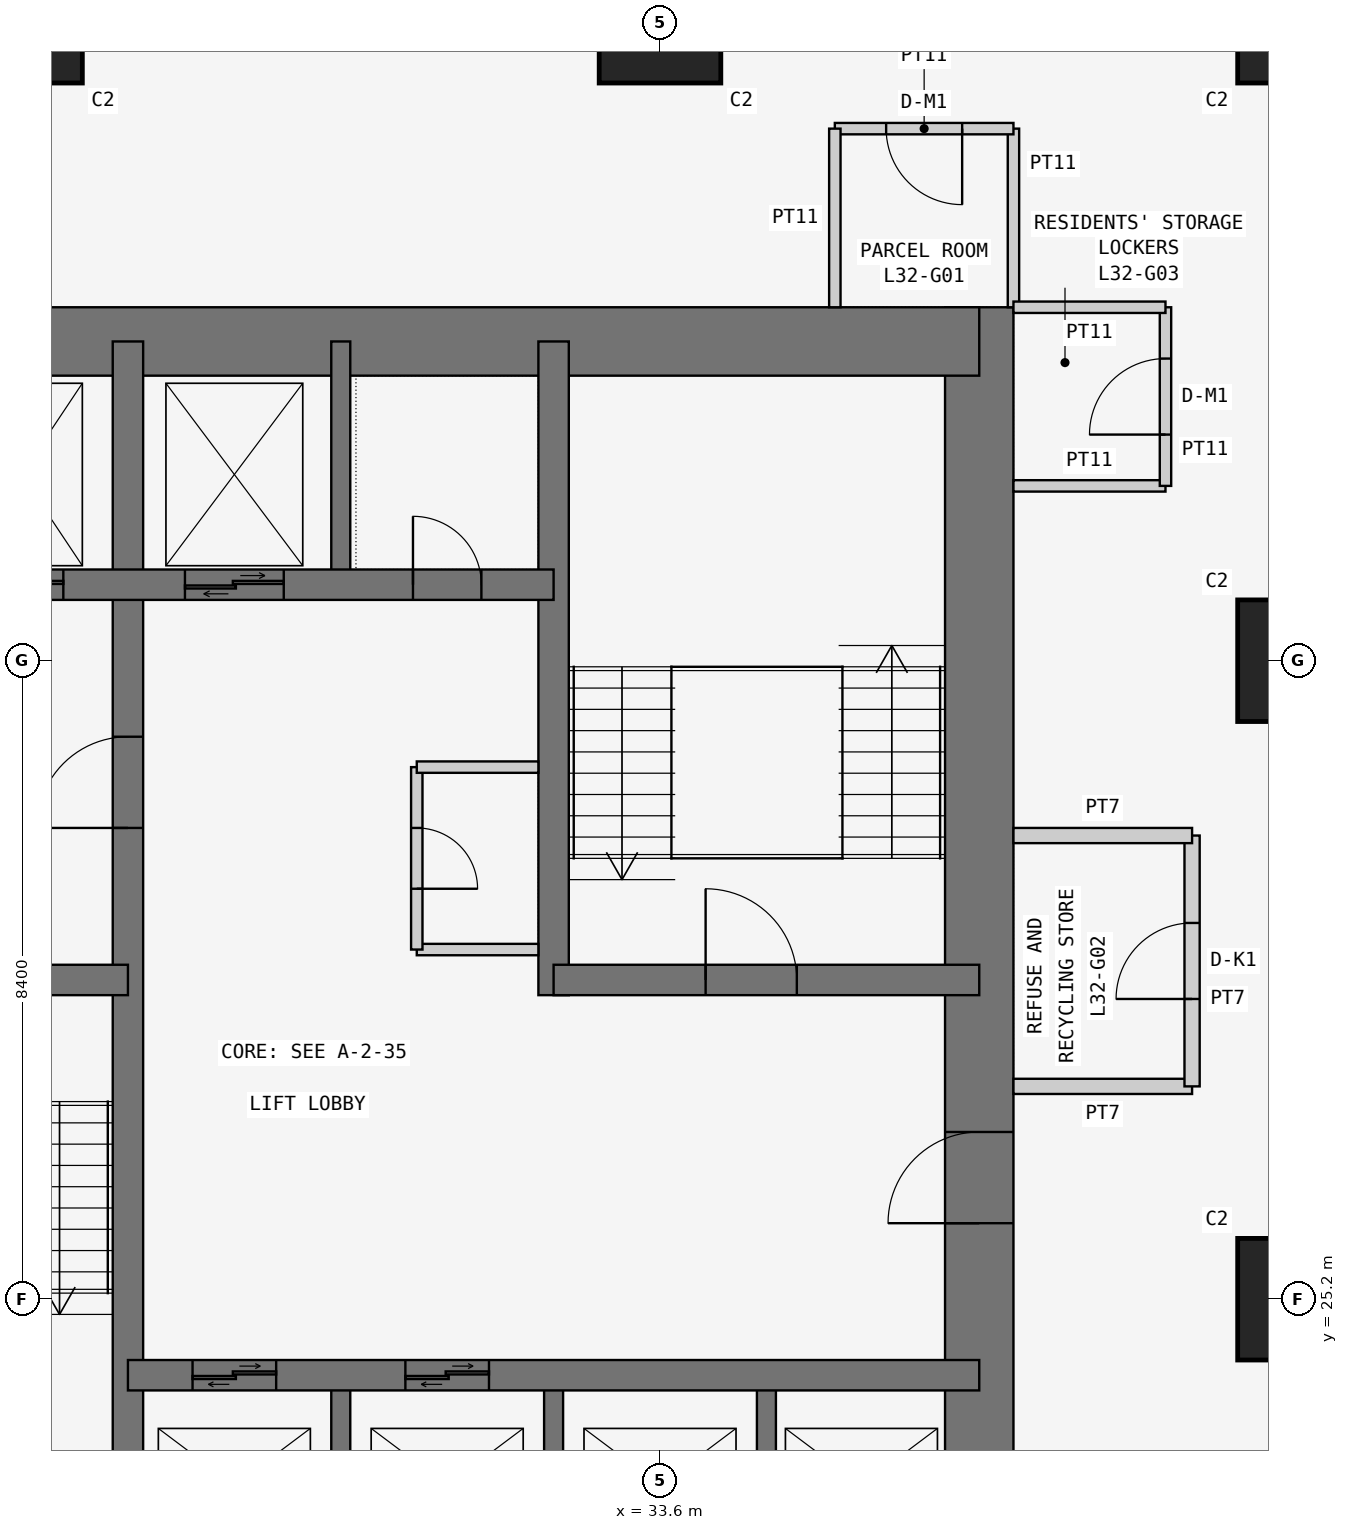
"""IFC4 building model, lengths in metres.
Left out: names, types, materials, properties, quantities, classifications, styles, units other than length and angle.
Written with IfcOpenShell. Run it as: python <this file> out.ifc"""

import sys

from ifc_helpers import new_model, si_unit, direction, frame, frame_2d, origin, origin_2d, place, context, subcontext, project, spatial, rectangle, extrude, element, fill, save


model = new_model("IFC4")
c1 = context("Model", 3, precision=1e-05, world=origin(), true_north=direction((0.0, 1.0)))
c2 = subcontext(c1, "Body", "Model", "MODEL_VIEW")
j1 = project(units=[si_unit("LENGTHUNIT", "METRE"), si_unit("PLANEANGLEUNIT", "RADIAN")], contexts=[c1])
p1 = place(None, origin())
s1 = spatial("IfcSite", under=j1, at=p1, CompositionType="ELEMENT")
p2 = place(p1, origin())
s2 = spatial("IfcBuilding", under=s1, at=p2, CompositionType="ELEMENT")
p3 = place(p2, frame((0.0, 0.0, 126.9)))
s3 = spatial("IfcBuildingStorey", under=s2, at=p3, CompositionType="ELEMENT", Elevation=126.9)
for number, where, z_axis, x_axis in (
    (1, (25.2, 42.0, 0.0), (0.0, 0.0, 1.0), (1.0, 0.0, 0.0)),
    (2, (33.6, 42.0, 0.0), (0.0, 0.0, 1.0), (1.0, 0.0, 0.0)),
    (3, (42.0, 25.2, 0.0), (0.0, 0.0, 1.0), (1.0, 0.0, 0.0)),
    (4, (42.0, 33.6, 0.0), (0.0, 0.0, 1.0), (1.0, 0.0, 0.0)),
    (5, (42.0, 42.0, 0.0), (0.0, 0.0, 1.0), (1.0, 0.0, 0.0)),
):
    element("IfcColumn", number, at=place(p3, frame(where, z_axis=z_axis, x_axis=x_axis)), inside=s3, PredefinedType="COLUMN", context=c2, shape_type="SweptSolid", body=[
        extrude(rectangle(XDim=1.6, YDim=1.6, at=origin_2d()), origin(), (0.0, 0.0, 1.0), 3.6),
    ])
p4 = place(p3, frame((37.8, 21.0, 0.0), z_axis=(0.0, 0.0, 1.0), x_axis=(0.0, 1.0, 0.0)))
e6 = element("IfcWall", 6, at=p4, inside=s3, PredefinedType="SHEAR", context=c2, shape_type="SweptSolid", body=[
    extrude(rectangle(XDim=17.25, YDim=0.9, at=frame_2d((8.625, 0.0))), origin(), (0.0, 0.0, 1.0), 3.6),
])
p5 = place(p4, frame((5.2, 0.0, 0.0)))
e7 = element("IfcOpeningElement", 7, at=p5, cuts=e6, PredefinedType="OPENING", context=c2, shape_type="SweptSolid", body=[
    extrude(rectangle(XDim=1.2, YDim=2.1, at=frame_2d((0.6, 1.05))), frame((0.0, 0.46, 0.0), z_axis=(0.0, -1.0, 0.0), x_axis=(1.0, 0.0, 0.0)), (0.0, 0.0, 1.0), 0.92),
])
p6 = place(p3, frame((37.8, 37.8, 0.0), z_axis=(0.0, 0.0, 1.0), x_axis=(-1.0, 0.0, 0.0)))
e8 = element("IfcWall", 8, at=p6, inside=s3, PredefinedType="SHEAR", context=c2, shape_type="SweptSolid", body=[
    extrude(rectangle(XDim=17.25, YDim=0.9, at=frame_2d((8.625, 0.0))), origin(), (0.0, 0.0, 1.0), 3.6),
])
p7 = place(p3, frame((26.6, 21.0, 0.0), z_axis=(0.0, 0.0, 1.0), x_axis=(0.0, 1.0, 0.0)))
e9 = element("IfcWall", 9, at=p7, inside=s3, PredefinedType="SHEAR", context=c2, shape_type="SweptSolid", body=[
    extrude(rectangle(XDim=16.8, YDim=0.4, at=frame_2d((8.4, 0.0))), origin(), (0.0, 0.0, 1.0), 3.6),
])
p8 = place(p7, frame((10.4, 0.0, 0.0)))
e10 = element("IfcOpeningElement", 10, at=p8, cuts=e9, PredefinedType="OPENING", context=c2, shape_type="SweptSolid", body=[
    extrude(rectangle(XDim=1.2, YDim=2.1, at=frame_2d((0.6, 1.05))), frame((0.0, 0.21, 0.0), z_axis=(0.0, -1.0, 0.0), x_axis=(1.0, 0.0, 0.0)), (0.0, 0.0, 1.0), 0.42),
])
p9 = place(p3, frame((21.0, 29.4, 0.0), z_axis=(0.0, 0.0, 1.0), x_axis=(1.0, 0.0, 0.0)))
e11 = element("IfcWall", 11, at=p9, inside=s3, PredefinedType="SHEAR", context=c2, shape_type="SweptSolid", body=[
    extrude(rectangle(XDim=5.6, YDim=0.4, at=frame_2d((2.8, 0.0))), origin(), (0.0, 0.0, 1.0), 3.6),
])
p10 = place(p9, frame((2.3, 0.0, 0.0)))
e12 = element("IfcOpeningElement", 12, at=p10, cuts=e11, PredefinedType="OPENING", context=c2, shape_type="SweptSolid", body=[
    extrude(rectangle(XDim=1.2, YDim=2.1, at=frame_2d((0.6, 1.05))), frame((0.0, 0.21, 0.0), z_axis=(0.0, -1.0, 0.0), x_axis=(1.0, 0.0, 0.0)), (0.0, 0.0, 1.0), 0.42),
])
p11 = place(p3, frame((21.0, 34.6, 0.0), z_axis=(0.0, 0.0, 1.0), x_axis=(1.0, 0.0, 0.0)))
e13 = element("IfcWall", 13, at=p11, inside=s3, PredefinedType="SHEAR", context=c2, shape_type="SweptSolid", body=[
    extrude(rectangle(XDim=11.2, YDim=0.4, at=frame_2d((5.6, 0.0))), origin(), (0.0, 0.0, 1.0), 3.6),
])
p12 = place(p11, frame((9.35, 0.0, 0.0)))
e14 = element("IfcOpeningElement", 14, at=p12, cuts=e13, PredefinedType="OPENING", context=c2, shape_type="SweptSolid", body=[
    extrude(rectangle(XDim=0.9, YDim=2.1, at=frame_2d((0.45, 1.05))), frame((0.0, 0.21, 0.0), z_axis=(0.0, -1.0, 0.0), x_axis=(1.0, 0.0, 0.0)), (0.0, 0.0, 1.0), 0.42),
])
p13 = place(p11, frame((1.0, 0.0, 0.0)))
e15 = element("IfcOpeningElement", 15, at=p13, cuts=e13, PredefinedType="OPENING", context=c2, shape_type="SweptSolid", body=[
    extrude(rectangle(XDim=1.1, YDim=2.1, at=frame_2d((0.55, 1.05))), frame((0.0, 0.21, 0.0), z_axis=(0.0, -1.0, 0.0), x_axis=(1.0, 0.0, 0.0)), (0.0, 0.0, 1.0), 0.42),
])
p14 = place(p11, frame((3.65, 0.0, 0.0)))
e16 = element("IfcOpeningElement", 16, at=p14, cuts=e13, PredefinedType="OPENING", context=c2, shape_type="SweptSolid", body=[
    extrude(rectangle(XDim=1.1, YDim=2.1, at=frame_2d((0.55, 1.05))), frame((0.0, 0.21, 0.0), z_axis=(0.0, -1.0, 0.0), x_axis=(1.0, 0.0, 0.0)), (0.0, 0.0, 1.0), 0.42),
])
p15 = place(p11, frame((6.35, 0.0, 0.0)))
e17 = element("IfcOpeningElement", 17, at=p15, cuts=e13, PredefinedType="OPENING", context=c2, shape_type="SweptSolid", body=[
    extrude(rectangle(XDim=1.3, YDim=2.1, at=frame_2d((0.65, 1.05))), frame((0.0, 0.21, 0.0), z_axis=(0.0, -1.0, 0.0), x_axis=(1.0, 0.0, 0.0)), (0.0, 0.0, 1.0), 0.42),
])
p16 = place(p3, frame((26.6, 24.2, 0.0), z_axis=(0.0, 0.0, 1.0), x_axis=(1.0, 0.0, 0.0)))
e18 = element("IfcWall", 18, at=p16, inside=s3, PredefinedType="SHEAR", context=c2, shape_type="SweptSolid", body=[
    extrude(rectangle(XDim=11.2, YDim=0.4, at=frame_2d((5.6, 0.0))), origin(), (0.0, 0.0, 1.0), 3.6),
])
p17 = place(p16, frame((0.85, 0.0, 0.0)))
e19 = element("IfcOpeningElement", 19, at=p17, cuts=e18, PredefinedType="OPENING", context=c2, shape_type="SweptSolid", body=[
    extrude(rectangle(XDim=1.1, YDim=2.1, at=frame_2d((0.55, 1.05))), frame((0.0, 0.21, 0.0), z_axis=(0.0, -1.0, 0.0), x_axis=(1.0, 0.0, 0.0)), (0.0, 0.0, 1.0), 0.42),
])
p18 = place(p16, frame((3.65, 0.0, 0.0)))
e20 = element("IfcOpeningElement", 20, at=p18, cuts=e18, PredefinedType="OPENING", context=c2, shape_type="SweptSolid", body=[
    extrude(rectangle(XDim=1.1, YDim=2.1, at=frame_2d((0.55, 1.05))), frame((0.0, 0.21, 0.0), z_axis=(0.0, -1.0, 0.0), x_axis=(1.0, 0.0, 0.0)), (0.0, 0.0, 1.0), 0.42),
])
p19 = place(p3, frame((32.2, 29.2, 0.0), z_axis=(0.0, 0.0, 1.0), x_axis=(0.0, 1.0, 0.0)))
e21 = element("IfcWall", 21, at=p19, inside=s3, PredefinedType="SHEAR", context=c2, shape_type="SweptSolid", body=[
    extrude(rectangle(XDim=8.6, YDim=0.4, at=frame_2d((4.3, 0.0))), origin(), (0.0, 0.0, 1.0), 3.6),
])
p20 = place(p3, frame((32.2, 29.4, 0.0), z_axis=(0.0, 0.0, 1.0), x_axis=(1.0, 0.0, 0.0)))
e22 = element("IfcWall", 22, at=p20, inside=s3, PredefinedType="SHEAR", context=c2, shape_type="SweptSolid", body=[
    extrude(rectangle(XDim=5.6, YDim=0.4, at=frame_2d((2.8, 0.0))), origin(), (0.0, 0.0, 1.0), 3.6),
])
p21 = place(p20, frame((2.0, 0.0, 0.0)))
e23 = element("IfcOpeningElement", 23, at=p21, cuts=e22, PredefinedType="OPENING", context=c2, shape_type="SweptSolid", body=[
    extrude(rectangle(XDim=1.2, YDim=2.1, at=frame_2d((0.6, 1.05))), frame((0.0, 0.21, 0.0), z_axis=(0.0, -1.0, 0.0), x_axis=(1.0, 0.0, 0.0)), (0.0, 0.0, 1.0), 0.42),
])
for number, where, z_axis, x_axis in (
    (24, (29.4, 21.0, 0.0), (0.0, 0.0, 1.0), (0.0, 1.0, 0.0)),
    (25, (32.2, 21.0, 0.0), (0.0, 0.0, 1.0), (0.0, 1.0, 0.0)),
    (26, (35.0, 21.0, 0.0), (0.0, 0.0, 1.0), (0.0, 1.0, 0.0)),
    (27, (29.4, 34.6, 0.0), (0.0, 0.0, 1.0), (0.0, 1.0, 0.0)),
):
    element("IfcWall", number, at=place(p3, frame(where, z_axis=z_axis, x_axis=x_axis)), inside=s3, PredefinedType="SHEAR", context=c2, shape_type="SweptSolid", body=[
        extrude(rectangle(XDim=3.2, YDim=0.25, at=frame_2d((1.6, 0.0))), origin(), (0.0, 0.0, 1.0), 3.6),
    ])
p22 = place(p3, frame((38.25, 38.25, 0.0), z_axis=(0.0, 0.0, 1.0), x_axis=(0.0, 1.0, 0.0)))
e28 = element("IfcWall", 28, at=p22, inside=s3, PredefinedType="PARTITIONING", context=c2, shape_type="SweptSolid", body=[
    extrude(rectangle(XDim=2.35, YDim=0.15, at=frame_2d((1.175, 0.0))), origin(), (0.0, 0.0, 1.0), 3.45),
])
p23 = place(p3, frame((38.25, 40.6, 0.0), z_axis=(0.0, 0.0, 1.0), x_axis=(-1.0, 0.0, 0.0)))
e29 = element("IfcWall", 29, at=p23, inside=s3, PredefinedType="PARTITIONING", context=c2, shape_type="SweptSolid", body=[
    extrude(rectangle(XDim=2.35, YDim=0.15, at=frame_2d((1.175, 0.0))), origin(), (0.0, 0.0, 1.0), 3.45),
])
p24 = place(p23, frame((0.675, 0.0, 0.0)))
e30 = element("IfcOpeningElement", 30, at=p24, cuts=e29, PredefinedType="OPENING", context=c2, shape_type="SweptSolid", body=[
    extrude(rectangle(XDim=1.0, YDim=2.1, at=frame_2d((0.5, 1.05))), frame((0.0, 0.085, 0.0), z_axis=(0.0, -1.0, 0.0), x_axis=(1.0, 0.0, 0.0)), (0.0, 0.0, 1.0), 0.17),
])
p25 = place(p3, frame((35.9, 40.6, 0.0), z_axis=(0.0, 0.0, 1.0), x_axis=(0.0, -1.0, 0.0)))
e31 = element("IfcWall", 31, at=p25, inside=s3, PredefinedType="PARTITIONING", context=c2, shape_type="SweptSolid", body=[
    extrude(rectangle(XDim=2.35, YDim=0.15, at=frame_2d((1.175, 0.0))), origin(), (0.0, 0.0, 1.0), 3.45),
])
p26 = place(p3, frame((38.25, 28.0, 0.0), z_axis=(0.0, 0.0, 1.0), x_axis=(1.0, 0.0, 0.0)))
e32 = element("IfcWall", 32, at=p26, inside=s3, PredefinedType="PARTITIONING", context=c2, shape_type="SweptSolid", body=[
    extrude(rectangle(XDim=2.35, YDim=0.2, at=frame_2d((1.175, 0.0))), origin(), (0.0, 0.0, 1.0), 3.45),
])
p27 = place(p3, frame((40.6, 28.0, 0.0), z_axis=(0.0, 0.0, 1.0), x_axis=(0.0, 1.0, 0.0)))
e33 = element("IfcWall", 33, at=p27, inside=s3, PredefinedType="PARTITIONING", context=c2, shape_type="SweptSolid", body=[
    extrude(rectangle(XDim=3.3, YDim=0.2, at=frame_2d((1.65, 0.0))), origin(), (0.0, 0.0, 1.0), 3.45),
])
p28 = place(p27, frame((1.15, 0.0, 0.0)))
e34 = element("IfcOpeningElement", 34, at=p28, cuts=e33, PredefinedType="OPENING", context=c2, shape_type="SweptSolid", body=[
    extrude(rectangle(XDim=1.0, YDim=2.1, at=frame_2d((0.5, 1.05))), frame((0.0, 0.11, 0.0), z_axis=(0.0, -1.0, 0.0), x_axis=(1.0, 0.0, 0.0)), (0.0, 0.0, 1.0), 0.22),
])
p29 = place(p3, frame((40.6, 31.3, 0.0), z_axis=(0.0, 0.0, 1.0), x_axis=(-1.0, 0.0, 0.0)))
e35 = element("IfcWall", 35, at=p29, inside=s3, PredefinedType="PARTITIONING", context=c2, shape_type="SweptSolid", body=[
    extrude(rectangle(XDim=2.35, YDim=0.2, at=frame_2d((1.175, 0.0))), origin(), (0.0, 0.0, 1.0), 3.45),
])
p30 = place(p3, frame((38.25, 35.9, 0.0), z_axis=(0.0, 0.0, 1.0), x_axis=(1.0, 0.0, 0.0)))
e36 = element("IfcWall", 36, at=p30, inside=s3, PredefinedType="PARTITIONING", context=c2, shape_type="SweptSolid", body=[
    extrude(rectangle(XDim=2.0, YDim=0.15, at=frame_2d((1.0, 0.0))), origin(), (0.0, 0.0, 1.0), 3.45),
])
p31 = place(p3, frame((40.25, 35.9, 0.0), z_axis=(0.0, 0.0, 1.0), x_axis=(0.0, 1.0, 0.0)))
e37 = element("IfcWall", 37, at=p31, inside=s3, PredefinedType="PARTITIONING", context=c2, shape_type="SweptSolid", body=[
    extrude(rectangle(XDim=2.35, YDim=0.15, at=frame_2d((1.175, 0.0))), origin(), (0.0, 0.0, 1.0), 3.45),
])
p32 = place(p31, frame((0.675, 0.0, 0.0)))
e38 = element("IfcOpeningElement", 38, at=p32, cuts=e37, PredefinedType="OPENING", context=c2, shape_type="SweptSolid", body=[
    extrude(rectangle(XDim=1.0, YDim=2.1, at=frame_2d((0.5, 1.05))), frame((0.0, 0.085, 0.0), z_axis=(0.0, -1.0, 0.0), x_axis=(1.0, 0.0, 0.0)), (0.0, 0.0, 1.0), 0.17),
])
p33 = place(p3, frame((40.25, 38.25, 0.0), z_axis=(0.0, 0.0, 1.0), x_axis=(-1.0, 0.0, 0.0)))
e39 = element("IfcWall", 39, at=p33, inside=s3, PredefinedType="PARTITIONING", context=c2, shape_type="SweptSolid", body=[
    extrude(rectangle(XDim=2.0, YDim=0.15, at=frame_2d((1.0, 0.0))), origin(), (0.0, 0.0, 1.0), 3.45),
])
p34 = place(p3, frame((32.0, 29.8, 0.0), z_axis=(0.0, 0.0, 1.0), x_axis=(-1.0, 0.0, 0.0)))
e40 = element("IfcWall", 40, at=p34, inside=s3, PredefinedType="PARTITIONING", context=c2, shape_type="SweptSolid", body=[
    extrude(rectangle(XDim=1.6, YDim=0.15, at=frame_2d((0.8, 0.0))), origin(), (0.0, 0.0, 1.0), 3.45),
])
p35 = place(p3, frame((30.4, 29.8, 0.0), z_axis=(0.0, 0.0, 1.0), x_axis=(0.0, 1.0, 0.0)))
e41 = element("IfcWall", 41, at=p35, inside=s3, PredefinedType="PARTITIONING", context=c2, shape_type="SweptSolid", body=[
    extrude(rectangle(XDim=2.4, YDim=0.15, at=frame_2d((1.2, 0.0))), origin(), (0.0, 0.0, 1.0), 3.45),
])
p36 = place(p35, frame((0.8, 0.0, 0.0)))
e42 = element("IfcOpeningElement", 42, at=p36, cuts=e41, PredefinedType="OPENING", context=c2, shape_type="SweptSolid", body=[
    extrude(rectangle(XDim=0.8, YDim=2.1, at=frame_2d((0.4, 1.05))), frame((0.0, 0.085, 0.0), z_axis=(0.0, -1.0, 0.0), x_axis=(1.0, 0.0, 0.0)), (0.0, 0.0, 1.0), 0.17),
])
p37 = place(p3, frame((30.4, 32.2, 0.0), z_axis=(0.0, 0.0, 1.0), x_axis=(1.0, 0.0, 0.0)))
e43 = element("IfcWall", 43, at=p37, inside=s3, PredefinedType="PARTITIONING", context=c2, shape_type="SweptSolid", body=[
    extrude(rectangle(XDim=1.6, YDim=0.15, at=frame_2d((0.8, 0.0))), origin(), (0.0, 0.0, 1.0), 3.45),
])
p38 = place(p24, origin())
e44 = element("IfcDoor", 44, at=p38, inside=s3, OperationType="SINGLE_SWING_LEFT", PredefinedType="DOOR", context=c2, shape_type="SweptSolid", body=[
    extrude(rectangle(XDim=1.0, YDim=2.1, at=frame_2d((0.5, 1.05))), frame((0.0, 0.025, 0.0), z_axis=(0.0, -1.0, 0.0), x_axis=(1.0, 0.0, 0.0)), (0.0, 0.0, 1.0), 0.05),
])
fill(e30, e44)
p39 = place(p28, origin())
e45 = element("IfcDoor", 45, at=p39, inside=s3, OperationType="SINGLE_SWING_LEFT", PredefinedType="DOOR", context=c2, shape_type="SweptSolid", body=[
    extrude(rectangle(XDim=1.0, YDim=2.1, at=frame_2d((0.5, 1.05))), frame((0.0, 0.025, 0.0), z_axis=(0.0, -1.0, 0.0), x_axis=(1.0, 0.0, 0.0)), (0.0, 0.0, 1.0), 0.05),
])
fill(e34, e45)
p40 = place(p32, origin())
e46 = element("IfcDoor", 46, at=p40, inside=s3, OperationType="SINGLE_SWING_LEFT", PredefinedType="DOOR", context=c2, shape_type="SweptSolid", body=[
    extrude(rectangle(XDim=1.0, YDim=2.1, at=frame_2d((0.5, 1.05))), frame((0.0, 0.025, 0.0), z_axis=(0.0, -1.0, 0.0), x_axis=(1.0, 0.0, 0.0)), (0.0, 0.0, 1.0), 0.05),
])
fill(e38, e46)
p41 = place(p8, origin())
e47 = element("IfcDoor", 47, at=p41, inside=s3, OperationType="SINGLE_SWING_LEFT", PredefinedType="DOOR", context=c2, shape_type="SweptSolid", body=[
    extrude(rectangle(XDim=1.2, YDim=2.1, at=frame_2d((0.6, 1.05))), frame((0.0, 0.025, 0.0), z_axis=(0.0, -1.0, 0.0), x_axis=(1.0, 0.0, 0.0)), (0.0, 0.0, 1.0), 0.05),
])
fill(e10, e47)
p42 = place(p5, origin())
e48 = element("IfcDoor", 48, at=p42, inside=s3, OperationType="SINGLE_SWING_LEFT", PredefinedType="DOOR", context=c2, shape_type="SweptSolid", body=[
    extrude(rectangle(XDim=1.2, YDim=2.1, at=frame_2d((0.6, 1.05))), frame((0.0, 0.025, 0.0), z_axis=(0.0, -1.0, 0.0), x_axis=(1.0, 0.0, 0.0)), (0.0, 0.0, 1.0), 0.05),
])
fill(e7, e48)
p43 = place(p21, origin())
e49 = element("IfcDoor", 49, at=p43, inside=s3, OperationType="SINGLE_SWING_LEFT", PredefinedType="DOOR", context=c2, shape_type="SweptSolid", body=[
    extrude(rectangle(XDim=1.2, YDim=2.1, at=frame_2d((0.6, 1.05))), frame((0.0, 0.025, 0.0), z_axis=(0.0, -1.0, 0.0), x_axis=(1.0, 0.0, 0.0)), (0.0, 0.0, 1.0), 0.05),
])
fill(e23, e49)
p44 = place(p12, origin())
e50 = element("IfcDoor", 50, at=p44, inside=s3, OperationType="SINGLE_SWING_LEFT", PredefinedType="DOOR", context=c2, shape_type="SweptSolid", body=[
    extrude(rectangle(XDim=0.9, YDim=2.1, at=frame_2d((0.45, 1.05))), frame((0.0, 0.025, 0.0), z_axis=(0.0, -1.0, 0.0), x_axis=(1.0, 0.0, 0.0)), (0.0, 0.0, 1.0), 0.05),
])
fill(e14, e50)
p45 = place(p36, frame((0.8, 0.0, 0.0), z_axis=(0.0, 0.0, 1.0), x_axis=(-1.0, 0.0, 0.0)))
e51 = element("IfcDoor", 51, at=p45, inside=s3, OperationType="SINGLE_SWING_RIGHT", PredefinedType="DOOR", context=c2, shape_type="SweptSolid", body=[
    extrude(rectangle(XDim=0.8, YDim=2.1, at=frame_2d((0.4, 1.05))), frame((0.0, 0.025, 0.0), z_axis=(0.0, -1.0, 0.0), x_axis=(1.0, 0.0, 0.0)), (0.0, 0.0, 1.0), 0.05),
])
fill(e42, e51)
p46 = place(p17, origin())
e52 = element("IfcDoor", 52, at=p46, inside=s3, OperationType="DOUBLE_DOOR_SLIDING", PredefinedType="DOOR", context=c2, shape_type="SweptSolid", body=[
    extrude(rectangle(XDim=1.1, YDim=2.1, at=frame_2d((0.55, 1.05))), frame((0.0, 0.025, 0.0), z_axis=(0.0, -1.0, 0.0), x_axis=(1.0, 0.0, 0.0)), (0.0, 0.0, 1.0), 0.05),
])
fill(e19, e52)
p47 = place(p18, origin())
e53 = element("IfcDoor", 53, at=p47, inside=s3, OperationType="DOUBLE_DOOR_SLIDING", PredefinedType="DOOR", context=c2, shape_type="SweptSolid", body=[
    extrude(rectangle(XDim=1.1, YDim=2.1, at=frame_2d((0.55, 1.05))), frame((0.0, 0.025, 0.0), z_axis=(0.0, -1.0, 0.0), x_axis=(1.0, 0.0, 0.0)), (0.0, 0.0, 1.0), 0.05),
])
fill(e20, e53)
p48 = place(p14, origin())
e54 = element("IfcDoor", 54, at=p48, inside=s3, OperationType="DOUBLE_DOOR_SLIDING", PredefinedType="DOOR", context=c2, shape_type="SweptSolid", body=[
    extrude(rectangle(XDim=1.1, YDim=2.1, at=frame_2d((0.55, 1.05))), frame((0.0, 0.025, 0.0), z_axis=(0.0, -1.0, 0.0), x_axis=(1.0, 0.0, 0.0)), (0.0, 0.0, 1.0), 0.05),
])
fill(e16, e54)
p49 = place(p15, origin())
e55 = element("IfcDoor", 55, at=p49, inside=s3, OperationType="DOUBLE_DOOR_SLIDING", PredefinedType="DOOR", context=c2, shape_type="SweptSolid", body=[
    extrude(rectangle(XDim=1.3, YDim=2.1, at=frame_2d((0.65, 1.05))), frame((0.0, 0.025, 0.0), z_axis=(0.0, -1.0, 0.0), x_axis=(1.0, 0.0, 0.0)), (0.0, 0.0, 1.0), 0.05),
])
fill(e17, e55)
save(model, sys.argv[1])
